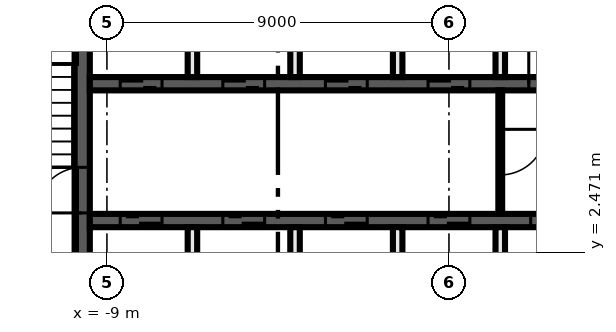
"""IFC4 building model, lengths in metres.
Left out: names, types, materials, properties, quantities, classifications, styles, units other than length and angle.
Written with IfcOpenShell. Run it as: python <this file> out.ifc"""

import sys

from ifc_helpers import new_model, si_unit, direction, frame, frame_2d, origin, place, context, subcontext, project, spatial, rectangle, extrude, element, fill, save


model = new_model("IFC4")
c1 = context("Model", 3, precision=1e-05, world=origin(), true_north=direction((0.0, 1.0)))
c2 = subcontext(c1, "Body", "Model", "MODEL_VIEW")
j1 = project(units=[si_unit("LENGTHUNIT", "METRE"), si_unit("PLANEANGLEUNIT", "RADIAN")], contexts=[c1])
p1 = place(None, origin())
s1 = spatial("IfcSite", under=j1, at=p1, CompositionType="ELEMENT")
p2 = place(p1, origin())
s2 = spatial("IfcBuilding", under=s1, at=p2, CompositionType="ELEMENT")
p3 = place(p2, frame((0.0, 0.0, 38.0)))
s3 = spatial("IfcBuildingStorey", under=s2, at=p3, CompositionType="ELEMENT", Elevation=38.0)
p4 = place(p3, frame((-9.65, 2.3, 0.0), z_axis=(0.0, 0.0, 1.0), x_axis=(0.0, 1.0, 0.0)))
e1 = element("IfcWall", 1, at=p4, inside=s3, PredefinedType="SHEAR", context=c2, shape_type="SweptSolid", body=[
    extrude(rectangle(XDim=7.5, YDim=0.4, at=frame_2d((3.75, 0.0))), origin(), (0.0, 0.0, 1.0), 5.6),
])
p5 = place(p4, frame((1.2, 0.0, 0.0)))
e2 = element("IfcOpeningElement", 2, at=p5, cuts=e1, PredefinedType="OPENING", context=c2, shape_type="SweptSolid", body=[
    extrude(rectangle(XDim=1.2, YDim=2.1, at=frame_2d((0.6, 1.05))), frame((0.0, 0.21, 0.0), z_axis=(0.0, -1.0, 0.0), x_axis=(1.0, 0.0, 0.0)), (0.0, 0.0, 1.0), 0.42),
])
p6 = place(p3, frame((-9.45, 6.9, 0.0), z_axis=(0.0, 0.0, 1.0), x_axis=(1.0, 0.0, 0.0)))
e3 = element("IfcWall", 3, at=p6, inside=s3, PredefinedType="SHEAR", context=c2, shape_type="SweptSolid", body=[
    extrude(rectangle(XDim=18.9, YDim=0.35, at=frame_2d((9.45, 0.0))), origin(), (0.0, 0.0, 1.0), 5.6),
])
p7 = place(p6, frame((0.8, 0.0, 0.0)))
e4 = element("IfcOpeningElement", 4, at=p7, cuts=e3, PredefinedType="OPENING", context=c2, shape_type="SweptSolid", body=[
    extrude(rectangle(XDim=1.1, YDim=2.1, at=frame_2d((0.55, 1.05))), frame((0.0, 0.185, 0.0), z_axis=(0.0, -1.0, 0.0), x_axis=(1.0, 0.0, 0.0)), (0.0, 0.0, 1.0), 0.37),
])
p8 = place(p6, frame((3.5, 0.0, 0.0)))
e5 = element("IfcOpeningElement", 5, at=p8, cuts=e3, PredefinedType="OPENING", context=c2, shape_type="SweptSolid", body=[
    extrude(rectangle(XDim=1.1, YDim=2.1, at=frame_2d((0.55, 1.05))), frame((0.0, 0.185, 0.0), z_axis=(0.0, -1.0, 0.0), x_axis=(1.0, 0.0, 0.0)), (0.0, 0.0, 1.0), 0.37),
])
p9 = place(p6, frame((6.2, 0.0, 0.0)))
e6 = element("IfcOpeningElement", 6, at=p9, cuts=e3, PredefinedType="OPENING", context=c2, shape_type="SweptSolid", body=[
    extrude(rectangle(XDim=1.1, YDim=2.1, at=frame_2d((0.55, 1.05))), frame((0.0, 0.185, 0.0), z_axis=(0.0, -1.0, 0.0), x_axis=(1.0, 0.0, 0.0)), (0.0, 0.0, 1.0), 0.37),
])
p10 = place(p6, frame((8.9, 0.0, 0.0)))
e7 = element("IfcOpeningElement", 7, at=p10, cuts=e3, PredefinedType="OPENING", context=c2, shape_type="SweptSolid", body=[
    extrude(rectangle(XDim=1.1, YDim=2.1, at=frame_2d((0.55, 1.05))), frame((0.0, 0.185, 0.0), z_axis=(0.0, -1.0, 0.0), x_axis=(1.0, 0.0, 0.0)), (0.0, 0.0, 1.0), 0.37),
])
p11 = place(p6, frame((11.55, 0.0, 0.0)))
e8 = element("IfcOpeningElement", 8, at=p11, cuts=e3, PredefinedType="OPENING", context=c2, shape_type="SweptSolid", body=[
    extrude(rectangle(XDim=1.2, YDim=2.1, at=frame_2d((0.6, 1.05))), frame((0.0, 0.185, 0.0), z_axis=(0.0, -1.0, 0.0), x_axis=(1.0, 0.0, 0.0)), (0.0, 0.0, 1.0), 0.37),
])
p12 = place(p6, frame((14.3, 0.0, 0.0)))
e9 = element("IfcOpeningElement", 9, at=p12, cuts=e3, PredefinedType="OPENING", context=c2, shape_type="SweptSolid", body=[
    extrude(rectangle(XDim=1.1, YDim=2.1, at=frame_2d((0.55, 1.05))), frame((0.0, 0.185, 0.0), z_axis=(0.0, -1.0, 0.0), x_axis=(1.0, 0.0, 0.0)), (0.0, 0.0, 1.0), 0.37),
])
p13 = place(p6, frame((17.0, 0.0, 0.0)))
e10 = element("IfcOpeningElement", 10, at=p13, cuts=e3, PredefinedType="OPENING", context=c2, shape_type="SweptSolid", body=[
    extrude(rectangle(XDim=1.1, YDim=2.1, at=frame_2d((0.55, 1.05))), frame((0.0, 0.185, 0.0), z_axis=(0.0, -1.0, 0.0), x_axis=(1.0, 0.0, 0.0)), (0.0, 0.0, 1.0), 0.37),
])
p14 = place(p3, frame((9.45, 3.3, 0.0), z_axis=(0.0, 0.0, 1.0), x_axis=(-1.0, 0.0, 0.0)))
e11 = element("IfcWall", 11, at=p14, inside=s3, PredefinedType="SHEAR", context=c2, shape_type="SweptSolid", body=[
    extrude(rectangle(XDim=18.9, YDim=0.35, at=frame_2d((9.45, 0.0))), origin(), (0.0, 0.0, 1.0), 5.6),
])
p15 = place(p14, frame((17.0, 0.0, 0.0)))
e12 = element("IfcOpeningElement", 12, at=p15, cuts=e11, PredefinedType="OPENING", context=c2, shape_type="SweptSolid", body=[
    extrude(rectangle(XDim=1.1, YDim=2.1, at=frame_2d((0.55, 1.05))), frame((0.0, 0.185, 0.0), z_axis=(0.0, -1.0, 0.0), x_axis=(1.0, 0.0, 0.0)), (0.0, 0.0, 1.0), 0.37),
])
p16 = place(p14, frame((14.3, 0.0, 0.0)))
e13 = element("IfcOpeningElement", 13, at=p16, cuts=e11, PredefinedType="OPENING", context=c2, shape_type="SweptSolid", body=[
    extrude(rectangle(XDim=1.1, YDim=2.1, at=frame_2d((0.55, 1.05))), frame((0.0, 0.185, 0.0), z_axis=(0.0, -1.0, 0.0), x_axis=(1.0, 0.0, 0.0)), (0.0, 0.0, 1.0), 0.37),
])
p17 = place(p14, frame((11.6, 0.0, 0.0)))
e14 = element("IfcOpeningElement", 14, at=p17, cuts=e11, PredefinedType="OPENING", context=c2, shape_type="SweptSolid", body=[
    extrude(rectangle(XDim=1.1, YDim=2.1, at=frame_2d((0.55, 1.05))), frame((0.0, 0.185, 0.0), z_axis=(0.0, -1.0, 0.0), x_axis=(1.0, 0.0, 0.0)), (0.0, 0.0, 1.0), 0.37),
])
p18 = place(p14, frame((8.9, 0.0, 0.0)))
e15 = element("IfcOpeningElement", 15, at=p18, cuts=e11, PredefinedType="OPENING", context=c2, shape_type="SweptSolid", body=[
    extrude(rectangle(XDim=1.1, YDim=2.1, at=frame_2d((0.55, 1.05))), frame((0.0, 0.185, 0.0), z_axis=(0.0, -1.0, 0.0), x_axis=(1.0, 0.0, 0.0)), (0.0, 0.0, 1.0), 0.37),
])
p19 = place(p14, frame((6.2, 0.0, 0.0)))
e16 = element("IfcOpeningElement", 16, at=p19, cuts=e11, PredefinedType="OPENING", context=c2, shape_type="SweptSolid", body=[
    extrude(rectangle(XDim=1.1, YDim=2.1, at=frame_2d((0.55, 1.05))), frame((0.0, 0.185, 0.0), z_axis=(0.0, -1.0, 0.0), x_axis=(1.0, 0.0, 0.0)), (0.0, 0.0, 1.0), 0.37),
])
p20 = place(p14, frame((3.5, 0.0, 0.0)))
e17 = element("IfcOpeningElement", 17, at=p20, cuts=e11, PredefinedType="OPENING", context=c2, shape_type="SweptSolid", body=[
    extrude(rectangle(XDim=1.1, YDim=2.1, at=frame_2d((0.55, 1.05))), frame((0.0, 0.185, 0.0), z_axis=(0.0, -1.0, 0.0), x_axis=(1.0, 0.0, 0.0)), (0.0, 0.0, 1.0), 0.37),
])
p21 = place(p14, frame((0.9, 0.0, 0.0)))
e18 = element("IfcOpeningElement", 18, at=p21, cuts=e11, PredefinedType="OPENING", context=c2, shape_type="SweptSolid", body=[
    extrude(rectangle(XDim=0.9, YDim=2.1, at=frame_2d((0.45, 1.05))), frame((0.0, 0.185, 0.0), z_axis=(0.0, -1.0, 0.0), x_axis=(1.0, 0.0, 0.0)), (0.0, 0.0, 1.0), 0.37),
])
p22 = place(p3, frame((1.35, 6.725, 0.0), z_axis=(0.0, 0.0, 1.0), x_axis=(0.0, -1.0, 0.0)))
e19 = element("IfcWall", 19, at=p22, inside=s3, PredefinedType="PARTITIONING", context=c2, shape_type="SweptSolid", body=[
    extrude(rectangle(XDim=3.25, YDim=0.1, at=frame_2d((1.625, 0.0))), origin(), (0.0, 0.0, 1.0), 5.6),
])
p23 = place(p22, frame((1.025, 0.0, 0.0)))
e20 = element("IfcOpeningElement", 20, at=p23, cuts=e19, PredefinedType="OPENING", context=c2, shape_type="SweptSolid", body=[
    extrude(rectangle(XDim=1.2, YDim=2.1, at=frame_2d((0.6, 1.05))), frame((0.0, 0.06, 0.0), z_axis=(0.0, -1.0, 0.0), x_axis=(1.0, 0.0, 0.0)), (0.0, 0.0, 1.0), 0.12),
])
for number, where, z_axis, x_axis in (
    (21, (1.35, 0.4, 0.0), (0.0, 0.0, 1.0), (0.0, 1.0, 0.0)),
    (22, (1.35, 7.075, 0.0), (0.0, 0.0, 1.0), (0.0, 1.0, 0.0)),
    (23, (-1.35, 0.4, 0.0), (0.0, 0.0, 1.0), (0.0, 1.0, 0.0)),
    (24, (-1.35, 7.075, 0.0), (0.0, 0.0, 1.0), (0.0, 1.0, 0.0)),
    (25, (-4.05, 0.4, 0.0), (0.0, 0.0, 1.0), (0.0, 1.0, 0.0)),
    (26, (-4.05, 7.075, 0.0), (0.0, 0.0, 1.0), (0.0, 1.0, 0.0)),
    (27, (-6.75, 0.4, 0.0), (0.0, 0.0, 1.0), (0.0, 1.0, 0.0)),
    (28, (-6.75, 7.075, 0.0), (0.0, 0.0, 1.0), (0.0, 1.0, 0.0)),
):
    element("IfcWall", number, at=place(p3, frame(where, z_axis=z_axis, x_axis=x_axis)), inside=s3, PredefinedType="SOLIDWALL", context=c2, shape_type="SweptSolid", body=[
        extrude(rectangle(XDim=2.725, YDim=0.25, at=frame_2d((1.363, 0.0))), origin(), (0.0, 0.0, 1.0), 5.6),
    ])
p24 = place(p7, origin())
e29 = element("IfcDoor", 29, at=p24, inside=s3, OperationType="DOUBLE_DOOR_SLIDING", PredefinedType="DOOR", context=c2, shape_type="SweptSolid", body=[
    extrude(rectangle(XDim=1.1, YDim=2.1, at=frame_2d((0.55, 1.05))), frame((0.0, 0.025, 0.0), z_axis=(0.0, -1.0, 0.0), x_axis=(1.0, 0.0, 0.0)), (0.0, 0.0, 1.0), 0.05),
])
fill(e4, e29)
p25 = place(p8, origin())
e30 = element("IfcDoor", 30, at=p25, inside=s3, OperationType="DOUBLE_DOOR_SLIDING", PredefinedType="DOOR", context=c2, shape_type="SweptSolid", body=[
    extrude(rectangle(XDim=1.1, YDim=2.1, at=frame_2d((0.55, 1.05))), frame((0.0, 0.025, 0.0), z_axis=(0.0, -1.0, 0.0), x_axis=(1.0, 0.0, 0.0)), (0.0, 0.0, 1.0), 0.05),
])
fill(e5, e30)
p26 = place(p9, origin())
e31 = element("IfcDoor", 31, at=p26, inside=s3, OperationType="DOUBLE_DOOR_SLIDING", PredefinedType="DOOR", context=c2, shape_type="SweptSolid", body=[
    extrude(rectangle(XDim=1.1, YDim=2.1, at=frame_2d((0.55, 1.05))), frame((0.0, 0.025, 0.0), z_axis=(0.0, -1.0, 0.0), x_axis=(1.0, 0.0, 0.0)), (0.0, 0.0, 1.0), 0.05),
])
fill(e6, e31)
p27 = place(p10, origin())
e32 = element("IfcDoor", 32, at=p27, inside=s3, OperationType="DOUBLE_DOOR_SLIDING", PredefinedType="DOOR", context=c2, shape_type="SweptSolid", body=[
    extrude(rectangle(XDim=1.1, YDim=2.1, at=frame_2d((0.55, 1.05))), frame((0.0, 0.025, 0.0), z_axis=(0.0, -1.0, 0.0), x_axis=(1.0, 0.0, 0.0)), (0.0, 0.0, 1.0), 0.05),
])
fill(e7, e32)
p28 = place(p11, origin())
e33 = element("IfcDoor", 33, at=p28, inside=s3, OperationType="SINGLE_SWING_LEFT", PredefinedType="DOOR", context=c2, shape_type="SweptSolid", body=[
    extrude(rectangle(XDim=1.2, YDim=2.1, at=frame_2d((0.6, 1.05))), frame((0.0, 0.025, 0.0), z_axis=(0.0, -1.0, 0.0), x_axis=(1.0, 0.0, 0.0)), (0.0, 0.0, 1.0), 0.05),
])
fill(e8, e33)
p29 = place(p15, origin())
e34 = element("IfcDoor", 34, at=p29, inside=s3, OperationType="DOUBLE_DOOR_SLIDING", PredefinedType="DOOR", context=c2, shape_type="SweptSolid", body=[
    extrude(rectangle(XDim=1.1, YDim=2.1, at=frame_2d((0.55, 1.05))), frame((0.0, 0.025, 0.0), z_axis=(0.0, -1.0, 0.0), x_axis=(1.0, 0.0, 0.0)), (0.0, 0.0, 1.0), 0.05),
])
fill(e12, e34)
p30 = place(p16, origin())
e35 = element("IfcDoor", 35, at=p30, inside=s3, OperationType="DOUBLE_DOOR_SLIDING", PredefinedType="DOOR", context=c2, shape_type="SweptSolid", body=[
    extrude(rectangle(XDim=1.1, YDim=2.1, at=frame_2d((0.55, 1.05))), frame((0.0, 0.025, 0.0), z_axis=(0.0, -1.0, 0.0), x_axis=(1.0, 0.0, 0.0)), (0.0, 0.0, 1.0), 0.05),
])
fill(e13, e35)
p31 = place(p17, origin())
e36 = element("IfcDoor", 36, at=p31, inside=s3, OperationType="DOUBLE_DOOR_SLIDING", PredefinedType="DOOR", context=c2, shape_type="SweptSolid", body=[
    extrude(rectangle(XDim=1.1, YDim=2.1, at=frame_2d((0.55, 1.05))), frame((0.0, 0.025, 0.0), z_axis=(0.0, -1.0, 0.0), x_axis=(1.0, 0.0, 0.0)), (0.0, 0.0, 1.0), 0.05),
])
fill(e14, e36)
p32 = place(p18, origin())
e37 = element("IfcDoor", 37, at=p32, inside=s3, OperationType="DOUBLE_DOOR_SLIDING", PredefinedType="DOOR", context=c2, shape_type="SweptSolid", body=[
    extrude(rectangle(XDim=1.1, YDim=2.1, at=frame_2d((0.55, 1.05))), frame((0.0, 0.025, 0.0), z_axis=(0.0, -1.0, 0.0), x_axis=(1.0, 0.0, 0.0)), (0.0, 0.0, 1.0), 0.05),
])
fill(e15, e37)
p33 = place(p19, origin())
e38 = element("IfcDoor", 38, at=p33, inside=s3, OperationType="DOUBLE_DOOR_SLIDING", PredefinedType="DOOR", context=c2, shape_type="SweptSolid", body=[
    extrude(rectangle(XDim=1.1, YDim=2.1, at=frame_2d((0.55, 1.05))), frame((0.0, 0.025, 0.0), z_axis=(0.0, -1.0, 0.0), x_axis=(1.0, 0.0, 0.0)), (0.0, 0.0, 1.0), 0.05),
])
fill(e16, e38)
p34 = place(p5, origin())
e39 = element("IfcDoor", 39, at=p34, inside=s3, OperationType="SINGLE_SWING_RIGHT", PredefinedType="DOOR", context=c2, shape_type="SweptSolid", body=[
    extrude(rectangle(XDim=1.2, YDim=2.1, at=frame_2d((0.6, 1.05))), frame((0.0, 0.025, 0.0), z_axis=(0.0, -1.0, 0.0), x_axis=(1.0, 0.0, 0.0)), (0.0, 0.0, 1.0), 0.05),
])
fill(e2, e39)
p35 = place(p23, origin())
e40 = element("IfcDoor", 40, at=p35, inside=s3, OperationType="SINGLE_SWING_LEFT", PredefinedType="DOOR", context=c2, shape_type="SweptSolid", body=[
    extrude(rectangle(XDim=1.2, YDim=2.1, at=frame_2d((0.6, 1.05))), frame((0.0, 0.025, 0.0), z_axis=(0.0, -1.0, 0.0), x_axis=(1.0, 0.0, 0.0)), (0.0, 0.0, 1.0), 0.05),
])
fill(e20, e40)
save(model, sys.argv[1])
